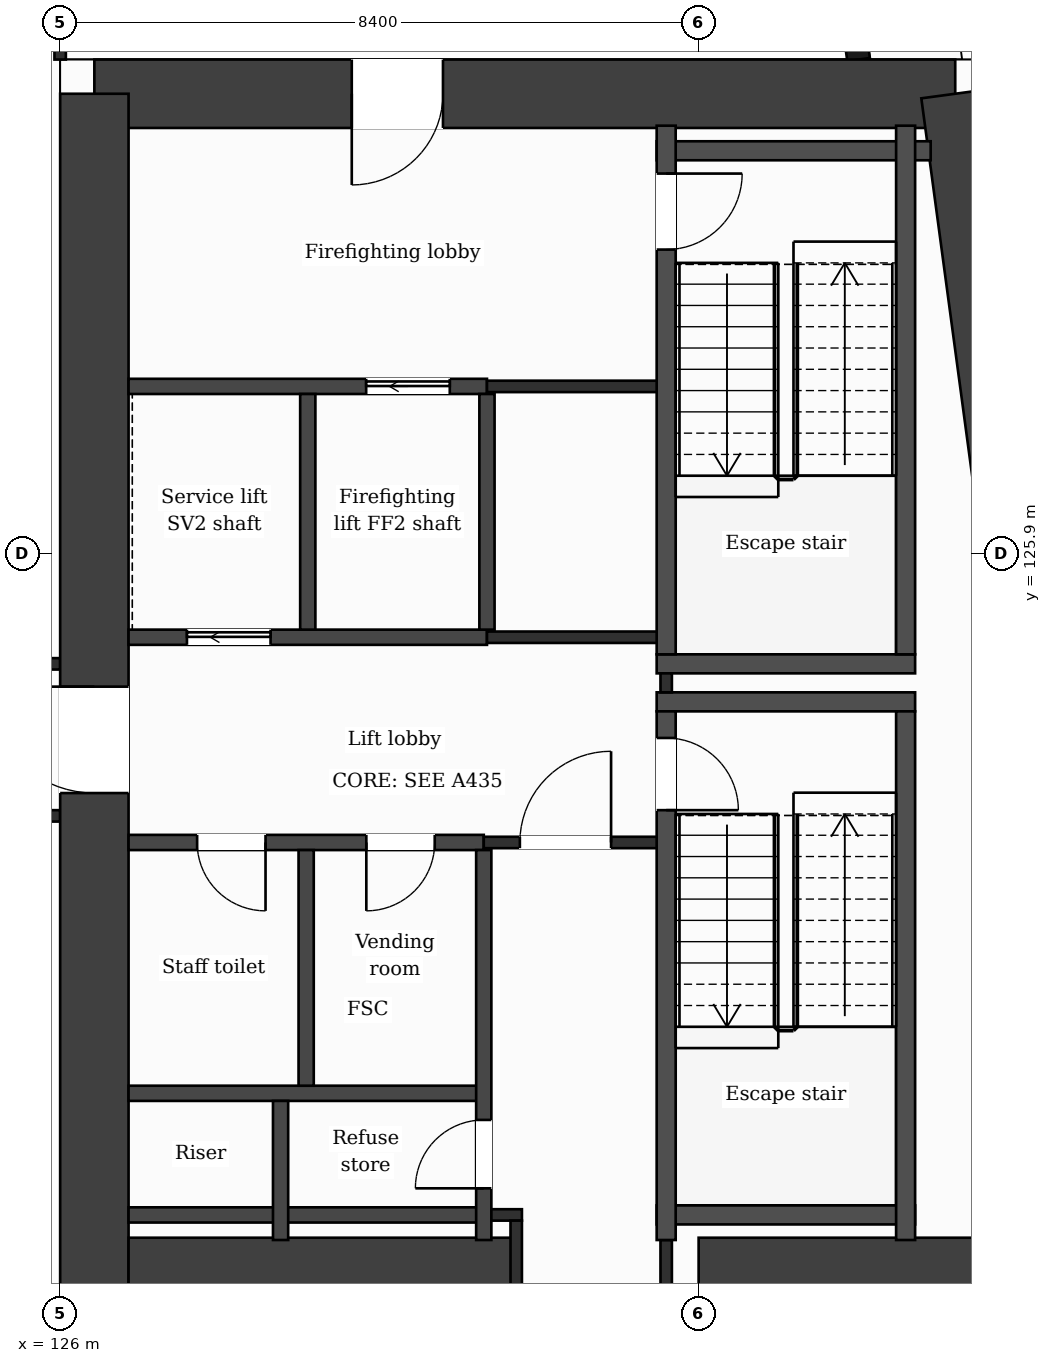
"""IFC4 building model, lengths in metres.
Left out: names, types, materials, properties, quantities, classifications, styles, units other than length and angle.
Written with IfcOpenShell. Run it as: python <this file> out.ifc"""

import sys

from ifc_helpers import new_model, si_unit, direction, frame, frame_2d, origin, place, context, subcontext, project, spatial, rectangle, extrude, element, fill, save


model = new_model("IFC4")
c1 = context("Model", 3, precision=1e-05, world=origin(), true_north=direction((0.0, 1.0)))
c2 = subcontext(c1, "Body", "Model", "MODEL_VIEW")
j1 = project(units=[si_unit("LENGTHUNIT", "METRE"), si_unit("PLANEANGLEUNIT", "RADIAN")], contexts=[c1])
p1 = place(None, origin())
s1 = spatial("IfcSite", under=j1, at=p1, CompositionType="ELEMENT")
p2 = place(p1, origin())
s2 = spatial("IfcBuilding", under=s1, at=p2, CompositionType="ELEMENT")
p3 = place(p2, frame((0.0, 0.0, 147.8)))
s3 = spatial("IfcBuildingStorey", under=s2, at=p3, CompositionType="ELEMENT", Elevation=147.8)
p4 = place(p3, frame((126.45, 131.95, 0.0), z_axis=(0.0, 0.0, 1.0), x_axis=(1.0, 0.0, 0.0)))
e1 = element("IfcWall", 1, at=p4, inside=s3, PredefinedType="SHEAR", context=c2, shape_type="SweptSolid", body=[
    extrude(rectangle(XDim=11.326, YDim=0.9, at=frame_2d((5.663, 0.0))), origin(), (0.0, 0.0, 1.0), 3.7),
])
p5 = place(p4, frame((3.386, 0.0, 0.0)))
e2 = element("IfcOpeningElement", 2, at=p5, cuts=e1, PredefinedType="OPENING", context=c2, shape_type="SweptSolid", body=[
    extrude(rectangle(XDim=1.2, YDim=2.1, at=frame_2d((0.6, 1.05))), frame((0.0, 0.46, 0.0), z_axis=(0.0, -1.0, 0.0), x_axis=(1.0, 0.0, 0.0)), (0.0, 0.0, 1.0), 0.92),
])
p6 = place(p3, frame((137.776, 131.95, 0.0), z_axis=(0.0, 0.0, 1.0), x_axis=(0.133421759112, -0.991059349482, 0.0)))
e3 = element("IfcWall", 3, at=p6, inside=s3, PredefinedType="SHEAR", context=c2, shape_type="SweptSolid", body=[
    extrude(rectangle(XDim=21.29, YDim=0.9, at=frame_2d((10.645, 0.0))), origin(), (0.0, 0.0, 1.0), 3.7),
])
p7 = place(p3, frame((126.45, 110.85, 0.0), z_axis=(0.0, 0.0, 1.0), x_axis=(0.0, 1.0, 0.0)))
e4 = element("IfcWall", 4, at=p7, inside=s3, PredefinedType="SHEAR", context=c2, shape_type="SweptSolid", body=[
    extrude(rectangle(XDim=21.1, YDim=0.9, at=frame_2d((10.55, 0.0))), origin(), (0.0, 0.0, 1.0), 3.7),
])
p8 = place(p7, frame((11.9, 0.0, 0.0)))
e5 = element("IfcOpeningElement", 5, at=p8, cuts=e4, PredefinedType="OPENING", context=c2, shape_type="SweptSolid", body=[
    extrude(rectangle(XDim=1.4, YDim=2.1, at=frame_2d((0.7, 1.05))), frame((0.0, 0.46, 0.0), z_axis=(0.0, -1.0, 0.0), x_axis=(1.0, 0.0, 0.0)), (0.0, 0.0, 1.0), 0.92),
])
p9 = place(p3, frame((126.9, 116.45, 0.0), z_axis=(0.0, 0.0, 1.0), x_axis=(1.0, 0.0, 0.0)))
e6 = element("IfcWall", 6, at=p9, inside=s3, PredefinedType="SHEAR", context=c2, shape_type="SweptSolid", body=[
    extrude(rectangle(XDim=5.1, YDim=0.9, at=frame_2d((2.55, 0.0))), origin(), (0.0, 0.0, 1.0), 3.7),
])
p10 = place(p3, frame((134.4, 116.45, 0.0), z_axis=(0.0, 0.0, 1.0), x_axis=(1.0, 0.0, 0.0)))
e7 = element("IfcWall", 7, at=p10, inside=s3, PredefinedType="SHEAR", context=c2, shape_type="SweptSolid", body=[
    extrude(rectangle(XDim=5.077, YDim=0.9, at=frame_2d((2.539, 0.0))), origin(), (0.0, 0.0, 1.0), 3.7),
])
p11 = place(p3, frame((136.504, 132.4, 0.0), z_axis=(0.0, 0.0, 1.0), x_axis=(-0.133399697462, 0.99106231929, 0.0)))
e8 = element("IfcWall", 8, at=p11, inside=s3, PredefinedType="SOLIDWALL", context=c2, shape_type="SweptSolid", body=[
    extrude(rectangle(XDim=6.74, YDim=0.3, at=frame_2d((3.37, 0.0))), origin(), (0.0, 0.0, 1.0), 3.38),
])
p12 = place(p11, frame((1.115, 0.0, 0.0)))
e9 = element("IfcOpeningElement", 9, at=p12, cuts=e8, PredefinedType="OPENING", context=c2, shape_type="SweptSolid", body=[
    extrude(rectangle(XDim=1.2, YDim=2.4, at=frame_2d((0.6, 1.2))), frame((0.0, 0.16, 0.0), z_axis=(0.0, -1.0, 0.0), x_axis=(1.0, 0.0, 0.0)), (0.0, 0.0, 1.0), 0.32),
])
p13 = place(p11, frame((3.835, 0.0, 0.9)))
e10 = element("IfcOpeningElement", 10, at=p13, cuts=e8, PredefinedType="OPENING", context=c2, shape_type="SweptSolid", body=[
    extrude(rectangle(XDim=2.4, YDim=2.1, at=frame_2d((1.2, 1.05))), frame((0.0, 0.16, 0.0), z_axis=(0.0, -1.0, 0.0), x_axis=(1.0, 0.0, 0.0)), (0.0, 0.0, 1.0), 0.32),
])
p14 = place(p3, frame((126.9, 117.2, 0.0), z_axis=(0.0, 0.0, 1.0), x_axis=(1.0, 0.0, 0.0)))
e11 = element("IfcWall", 11, at=p14, inside=s3, PredefinedType="PARTITIONING", context=c2, shape_type="SweptSolid", body=[
    extrude(rectangle(XDim=4.673, YDim=0.2, at=frame_2d((2.336, 0.0))), origin(), (0.0, 0.0, 1.0), 3.38),
])
p15 = place(p3, frame((131.573, 117.2, 0.0), z_axis=(0.0, 0.0, 1.0), x_axis=(1.0, 0.0, 0.0)))
e12 = element("IfcWall", 12, at=p15, inside=s3, PredefinedType="PARTITIONING", context=c2, shape_type="SweptSolid", body=[
    extrude(rectangle(XDim=0.502, YDim=0.15, at=frame_2d((0.251, 0.0))), origin(), (0.0, 0.0, 1.0), 3.38),
])
p16 = place(p3, frame((133.848, 117.2, 0.0), z_axis=(0.0, 0.0, 1.0), x_axis=(1.0, 0.0, 0.0)))
e13 = element("IfcWall", 13, at=p16, inside=s3, PredefinedType="PARTITIONING", context=c2, shape_type="SweptSolid", body=[
    extrude(rectangle(XDim=3.4, YDim=0.25, at=frame_2d((1.7, 0.0))), origin(), (0.0, 0.0, 1.0), 3.38),
])
p17 = place(p3, frame((126.9, 118.8, 0.0), z_axis=(0.0, 0.0, 1.0), x_axis=(1.0, 0.0, 0.0)))
e14 = element("IfcWall", 14, at=p17, inside=s3, PredefinedType="PARTITIONING", context=c2, shape_type="SweptSolid", body=[
    extrude(rectangle(XDim=4.673, YDim=0.2, at=frame_2d((2.336, 0.0))), origin(), (0.0, 0.0, 1.0), 3.38),
])
p18 = place(p3, frame((126.9, 122.1, 0.0), z_axis=(0.0, 0.0, 1.0), x_axis=(1.0, 0.0, 0.0)))
e15 = element("IfcWall", 15, at=p18, inside=s3, PredefinedType="PARTITIONING", context=c2, shape_type="SweptSolid", body=[
    extrude(rectangle(XDim=4.673, YDim=0.2, at=frame_2d((2.336, 0.0))), origin(), (0.0, 0.0, 1.0), 3.38),
])
p19 = place(p18, frame((3.128, 0.0, 0.0)))
e16 = element("IfcOpeningElement", 16, at=p19, cuts=e15, PredefinedType="OPENING", context=c2, shape_type="SweptSolid", body=[
    extrude(rectangle(XDim=0.9, YDim=2.1, at=frame_2d((0.45, 1.05))), frame((0.0, 0.11, 0.0), z_axis=(0.0, -1.0, 0.0), x_axis=(1.0, 0.0, 0.0)), (0.0, 0.0, 1.0), 0.22),
])
p20 = place(p18, frame((0.902, 0.0, 0.0)))
e17 = element("IfcOpeningElement", 17, at=p20, cuts=e15, PredefinedType="OPENING", context=c2, shape_type="SweptSolid", body=[
    extrude(rectangle(XDim=0.9, YDim=2.1, at=frame_2d((0.45, 1.05))), frame((0.0, 0.11, 0.0), z_axis=(0.0, -1.0, 0.0), x_axis=(1.0, 0.0, 0.0)), (0.0, 0.0, 1.0), 0.22),
])
p21 = place(p3, frame((131.573, 122.1, 0.0), z_axis=(0.0, 0.0, 1.0), x_axis=(1.0, 0.0, 0.0)))
e18 = element("IfcWall", 18, at=p21, inside=s3, PredefinedType="PARTITIONING", context=c2, shape_type="SweptSolid", body=[
    extrude(rectangle(XDim=2.4, YDim=0.15, at=frame_2d((1.2, 0.0))), origin(), (0.0, 0.0, 1.0), 3.38),
])
p22 = place(p21, frame((0.475, 0.0, 0.0)))
e19 = element("IfcOpeningElement", 19, at=p22, cuts=e18, PredefinedType="OPENING", context=c2, shape_type="SweptSolid", body=[
    extrude(rectangle(XDim=1.2, YDim=2.1, at=frame_2d((0.6, 1.05))), frame((0.0, 0.085, 0.0), z_axis=(0.0, -1.0, 0.0), x_axis=(1.0, 0.0, 0.0)), (0.0, 0.0, 1.0), 0.17),
])
p23 = place(p3, frame((100.8, 122.45, 0.0), z_axis=(0.0, 0.0, 1.0), x_axis=(1.0, 0.0, 0.0)))
e20 = element("IfcWall", 20, at=p23, inside=s3, PredefinedType="PARTITIONING", context=c2, shape_type="SweptSolid", body=[
    extrude(rectangle(XDim=25.2, YDim=0.15, at=frame_2d((12.6, 0.0))), origin(), (0.0, 0.0, 1.0), 3.38),
])
for number, where, z_axis, x_axis in (
    (21, (133.848, 123.95, 0.0), (0.0, 0.0, 1.0), (1.0, 0.0, 0.0)),
    (22, (133.848, 124.45, 0.0), (0.0, 0.0, 1.0), (1.0, 0.0, 0.0)),
):
    element("IfcWall", number, at=place(p3, frame(where, z_axis=z_axis, x_axis=x_axis)), inside=s3, PredefinedType="PARTITIONING", context=c2, shape_type="SweptSolid", body=[
        extrude(rectangle(XDim=3.4, YDim=0.25, at=frame_2d((1.7, 0.0))), origin(), (0.0, 0.0, 1.0), 3.38),
    ])
p24 = place(p3, frame((100.8, 124.45, 0.0), z_axis=(0.0, 0.0, 1.0), x_axis=(1.0, 0.0, 0.0)))
e23 = element("IfcWall", 23, at=p24, inside=s3, PredefinedType="PARTITIONING", context=c2, shape_type="SweptSolid", body=[
    extrude(rectangle(XDim=25.2, YDim=0.15, at=frame_2d((12.6, 0.0))), origin(), (0.0, 0.0, 1.0), 3.38),
])
p25 = place(p24, frame((3.03, 0.0, 0.0)))
e24 = element("IfcOpeningElement", 24, at=p25, cuts=e23, PredefinedType="OPENING", context=c2, shape_type="SweptSolid", body=[
    extrude(rectangle(XDim=1.0, YDim=2.1, at=frame_2d((0.5, 1.05))), frame((0.0, 0.085, 0.0), z_axis=(0.0, -1.0, 0.0), x_axis=(1.0, 0.0, 0.0)), (0.0, 0.0, 1.0), 0.17),
])
p26 = place(p24, frame((12.77, 0.0, 0.0)))
e25 = element("IfcOpeningElement", 25, at=p26, cuts=e23, PredefinedType="OPENING", context=c2, shape_type="SweptSolid", body=[
    extrude(rectangle(XDim=1.0, YDim=2.1, at=frame_2d((0.5, 1.05))), frame((0.0, 0.085, 0.0), z_axis=(0.0, -1.0, 0.0), x_axis=(1.0, 0.0, 0.0)), (0.0, 0.0, 1.0), 0.17),
])
p27 = place(p24, frame((17.67, 0.0, 0.0)))
e26 = element("IfcOpeningElement", 26, at=p27, cuts=e23, PredefinedType="OPENING", context=c2, shape_type="SweptSolid", body=[
    extrude(rectangle(XDim=1.0, YDim=2.1, at=frame_2d((0.5, 1.05))), frame((0.0, 0.085, 0.0), z_axis=(0.0, -1.0, 0.0), x_axis=(1.0, 0.0, 0.0)), (0.0, 0.0, 1.0), 0.17),
])
p28 = place(p24, frame((22.35, 0.0, 0.0)))
e27 = element("IfcOpeningElement", 27, at=p28, cuts=e23, PredefinedType="OPENING", context=c2, shape_type="SweptSolid", body=[
    extrude(rectangle(XDim=1.0, YDim=2.1, at=frame_2d((0.5, 1.05))), frame((0.0, 0.085, 0.0), z_axis=(0.0, -1.0, 0.0), x_axis=(1.0, 0.0, 0.0)), (0.0, 0.0, 1.0), 0.17),
])
p29 = place(p3, frame((126.9, 124.8, 0.0), z_axis=(0.0, 0.0, 1.0), x_axis=(1.0, 0.0, 0.0)))
e28 = element("IfcWall", 28, at=p29, inside=s3, PredefinedType="PARTITIONING", context=c2, shape_type="SweptSolid", body=[
    extrude(rectangle(XDim=4.715, YDim=0.2, at=frame_2d((2.358, 0.0))), origin(), (0.0, 0.0, 1.0), 3.38),
])
p30 = place(p29, frame((0.768, 0.0, 0.0)))
e29 = element("IfcOpeningElement", 29, at=p30, cuts=e28, PredefinedType="OPENING", context=c2, shape_type="SweptSolid", body=[
    extrude(rectangle(XDim=1.1, YDim=2.1, at=frame_2d((0.55, 1.05))), frame((0.0, 0.11, 0.0), z_axis=(0.0, -1.0, 0.0), x_axis=(1.0, 0.0, 0.0)), (0.0, 0.0, 1.0), 0.22),
])
p31 = place(p3, frame((131.615, 124.8, 0.0), z_axis=(0.0, 0.0, 1.0), x_axis=(1.0, 0.0, 0.0)))
e30 = element("IfcWall", 30, at=p31, inside=s3, PredefinedType="PARTITIONING", context=c2, shape_type="SweptSolid", body=[
    extrude(rectangle(XDim=2.483, YDim=0.15, at=frame_2d((1.241, 0.0))), origin(), (0.0, 0.0, 1.0), 3.38),
])
p32 = place(p3, frame((126.9, 128.1, 0.0), z_axis=(0.0, 0.0, 1.0), x_axis=(1.0, 0.0, 0.0)))
e31 = element("IfcWall", 31, at=p32, inside=s3, PredefinedType="PARTITIONING", context=c2, shape_type="SweptSolid", body=[
    extrude(rectangle(XDim=4.715, YDim=0.2, at=frame_2d((2.358, 0.0))), origin(), (0.0, 0.0, 1.0), 3.38),
])
p33 = place(p32, frame((3.126, 0.0, 0.0)))
e32 = element("IfcOpeningElement", 32, at=p33, cuts=e31, PredefinedType="OPENING", context=c2, shape_type="SweptSolid", body=[
    extrude(rectangle(XDim=1.1, YDim=2.1, at=frame_2d((0.55, 1.05))), frame((0.0, 0.11, 0.0), z_axis=(0.0, -1.0, 0.0), x_axis=(1.0, 0.0, 0.0)), (0.0, 0.0, 1.0), 0.22),
])
p34 = place(p3, frame((131.615, 128.1, 0.0), z_axis=(0.0, 0.0, 1.0), x_axis=(1.0, 0.0, 0.0)))
e33 = element("IfcWall", 33, at=p34, inside=s3, PredefinedType="PARTITIONING", context=c2, shape_type="SweptSolid", body=[
    extrude(rectangle(XDim=2.358, YDim=0.15, at=frame_2d((1.179, 0.0))), origin(), (0.0, 0.0, 1.0), 3.38),
])
p35 = place(p3, frame((133.848, 131.2, 0.0), z_axis=(0.0, 0.0, 1.0), x_axis=(1.0, 0.0, 0.0)))
e34 = element("IfcWall", 34, at=p35, inside=s3, PredefinedType="PARTITIONING", context=c2, shape_type="SweptSolid", body=[
    extrude(rectangle(XDim=3.605, YDim=0.25, at=frame_2d((1.802, 0.0))), origin(), (0.0, 0.0, 1.0), 3.38),
])
p36 = place(p3, frame((126.0, 132.4, 0.0), z_axis=(0.0, 0.0, 1.0), x_axis=(0.0, 1.0, 0.0)))
e35 = element("IfcWall", 35, at=p36, inside=s3, PredefinedType="PARTITIONING", context=c2, shape_type="SweptSolid", body=[
    extrude(rectangle(XDim=1.325, YDim=0.15, at=frame_2d((0.663, 0.0))), origin(), (0.0, 0.0, 1.0), 3.38),
])
p37 = place(p3, frame((128.9, 116.87, 0.0), z_axis=(0.0, 0.0, 1.0), x_axis=(0.0, 1.0, 0.0)))
e36 = element("IfcWall", 36, at=p37, inside=s3, PredefinedType="PARTITIONING", context=c2, shape_type="SweptSolid", body=[
    extrude(rectangle(XDim=1.83, YDim=0.2, at=frame_2d((0.915, 0.0))), origin(), (0.0, 0.0, 1.0), 3.38),
])
for number, where, z_axis, x_axis in (
    (37, (129.237, 118.9, 0.0), (0.0, 0.0, 1.0), (0.0, 1.0, 0.0)),
    (38, (129.258, 124.9, 0.0), (0.0, 0.0, 1.0), (0.0, 1.0, 0.0)),
):
    element("IfcWall", number, at=place(p3, frame(where, z_axis=z_axis, x_axis=x_axis)), inside=s3, PredefinedType="PARTITIONING", context=c2, shape_type="SweptSolid", body=[
        extrude(rectangle(XDim=3.1, YDim=0.2, at=frame_2d((1.55, 0.0))), origin(), (0.0, 0.0, 1.0), 3.38),
    ])
p38 = place(p3, frame((131.573, 116.87, 0.0), z_axis=(0.0, 0.0, 1.0), x_axis=(0.0, 1.0, 0.0)))
e39 = element("IfcWall", 39, at=p38, inside=s3, PredefinedType="PARTITIONING", context=c2, shape_type="SweptSolid", body=[
    extrude(rectangle(XDim=5.13, YDim=0.2, at=frame_2d((2.565, 0.0))), origin(), (0.0, 0.0, 1.0), 3.38),
])
p39 = place(p38, frame((0.68, 0.0, 0.0)))
e40 = element("IfcOpeningElement", 40, at=p39, cuts=e39, PredefinedType="OPENING", context=c2, shape_type="SweptSolid", body=[
    extrude(rectangle(XDim=0.9, YDim=2.1, at=frame_2d((0.45, 1.05))), frame((0.0, 0.11, 0.0), z_axis=(0.0, -1.0, 0.0), x_axis=(1.0, 0.0, 0.0)), (0.0, 0.0, 1.0), 0.22),
])
p40 = place(p3, frame((131.615, 124.9, 0.0), z_axis=(0.0, 0.0, 1.0), x_axis=(0.0, 1.0, 0.0)))
e41 = element("IfcWall", 41, at=p40, inside=s3, PredefinedType="PARTITIONING", context=c2, shape_type="SweptSolid", body=[
    extrude(rectangle(XDim=3.1, YDim=0.2, at=frame_2d((1.55, 0.0))), origin(), (0.0, 0.0, 1.0), 3.38),
])
p41 = place(p3, frame((132.0, 116.0, 0.0), z_axis=(0.0, 0.0, 1.0), x_axis=(0.0, 1.0, 0.0)))
e42 = element("IfcWall", 42, at=p41, inside=s3, PredefinedType="PARTITIONING", context=c2, shape_type="SweptSolid", body=[
    extrude(rectangle(XDim=1.125, YDim=0.15, at=frame_2d((0.562, 0.0))), origin(), (0.0, 0.0, 1.0), 3.38),
])
p42 = place(p3, frame((133.973, 116.0, 0.0), z_axis=(0.0, 0.0, 1.0), x_axis=(0.0, 1.0, 0.0)))
e43 = element("IfcWall", 43, at=p42, inside=s3, PredefinedType="PARTITIONING", context=c2, shape_type="SweptSolid", body=[
    extrude(rectangle(XDim=0.87, YDim=0.15, at=frame_2d((0.435, 0.0))), origin(), (0.0, 0.0, 1.0), 3.38),
])
p43 = place(p3, frame((133.973, 124.075, 0.0), z_axis=(0.0, 0.0, 1.0), x_axis=(0.0, 1.0, 0.0)))
e44 = element("IfcWall", 44, at=p43, inside=s3, PredefinedType="PARTITIONING", context=c2, shape_type="SweptSolid", body=[
    extrude(rectangle(XDim=0.25, YDim=0.15, at=frame_2d((0.125, 0.0))), origin(), (0.0, 0.0, 1.0), 3.38),
])
p44 = place(p3, frame((133.973, 116.87, 0.0), z_axis=(0.0, 0.0, 1.0), x_axis=(0.0, 1.0, 0.0)))
e45 = element("IfcWall", 45, at=p44, inside=s3, PredefinedType="PARTITIONING", context=c2, shape_type="SweptSolid", body=[
    extrude(rectangle(XDim=6.955, YDim=0.25, at=frame_2d((3.478, 0.0))), origin(), (0.0, 0.0, 1.0), 3.38),
])
p45 = place(p44, frame((5.655, 0.0, 0.0)))
e46 = element("IfcOpeningElement", 46, at=p45, cuts=e45, PredefinedType="OPENING", context=c2, shape_type="SweptSolid", body=[
    extrude(rectangle(XDim=0.95, YDim=2.1, at=frame_2d((0.475, 1.05))), frame((0.0, 0.135, 0.0), z_axis=(0.0, -1.0, 0.0), x_axis=(1.0, 0.0, 0.0)), (0.0, 0.0, 1.0), 0.27),
])
p46 = place(p3, frame((133.973, 124.575, 0.0), z_axis=(0.0, 0.0, 1.0), x_axis=(0.0, 1.0, 0.0)))
e47 = element("IfcWall", 47, at=p46, inside=s3, PredefinedType="PARTITIONING", context=c2, shape_type="SweptSolid", body=[
    extrude(rectangle(XDim=6.955, YDim=0.25, at=frame_2d((3.478, 0.0))), origin(), (0.0, 0.0, 1.0), 3.38),
])
p47 = place(p46, frame((5.325, 0.0, 0.0)))
e48 = element("IfcOpeningElement", 48, at=p47, cuts=e47, PredefinedType="OPENING", context=c2, shape_type="SweptSolid", body=[
    extrude(rectangle(XDim=1.0, YDim=2.1, at=frame_2d((0.5, 1.05))), frame((0.0, 0.135, 0.0), z_axis=(0.0, -1.0, 0.0), x_axis=(1.0, 0.0, 0.0)), (0.0, 0.0, 1.0), 0.27),
])
p48 = place(p3, frame((137.123, 116.87, 0.0), z_axis=(0.0, 0.0, 1.0), x_axis=(0.0, 1.0, 0.0)))
e49 = element("IfcWall", 49, at=p48, inside=s3, PredefinedType="PARTITIONING", context=c2, shape_type="SweptSolid", body=[
    extrude(rectangle(XDim=6.955, YDim=0.25, at=frame_2d((3.478, 0.0))), origin(), (0.0, 0.0, 1.0), 3.38),
])
p49 = place(p3, frame((137.123, 124.575, 0.0), z_axis=(0.0, 0.0, 1.0), x_axis=(0.0, 1.0, 0.0)))
e50 = element("IfcWall", 50, at=p49, inside=s3, PredefinedType="PARTITIONING", context=c2, shape_type="SweptSolid", body=[
    extrude(rectangle(XDim=6.955, YDim=0.25, at=frame_2d((3.478, 0.0))), origin(), (0.0, 0.0, 1.0), 3.38),
])
p50 = place(p22, origin())
e51 = element("IfcDoor", 51, at=p50, inside=s3, OperationType="SINGLE_SWING_RIGHT", PredefinedType="DOOR", context=c2, shape_type="SweptSolid", body=[
    extrude(rectangle(XDim=1.2, YDim=2.1, at=frame_2d((0.6, 1.05))), frame((0.0, 0.025, 0.0), z_axis=(0.0, -1.0, 0.0), x_axis=(1.0, 0.0, 0.0)), (0.0, 0.0, 1.0), 0.05),
])
fill(e19, e51)
p51 = place(p33, origin())
e52 = element("IfcDoor", 52, at=p51, inside=s3, OperationType="SLIDING_TO_LEFT", PredefinedType="DOOR", context=c2, shape_type="SweptSolid", body=[
    extrude(rectangle(XDim=1.1, YDim=2.1, at=frame_2d((0.55, 1.05))), frame((0.0, 0.025, 0.0), z_axis=(0.0, -1.0, 0.0), x_axis=(1.0, 0.0, 0.0)), (0.0, 0.0, 1.0), 0.05),
])
fill(e32, e52)
p52 = place(p30, origin())
e53 = element("IfcDoor", 53, at=p52, inside=s3, OperationType="SLIDING_TO_LEFT", PredefinedType="DOOR", context=c2, shape_type="SweptSolid", body=[
    extrude(rectangle(XDim=1.1, YDim=2.1, at=frame_2d((0.55, 1.05))), frame((0.0, 0.025, 0.0), z_axis=(0.0, -1.0, 0.0), x_axis=(1.0, 0.0, 0.0)), (0.0, 0.0, 1.0), 0.05),
])
fill(e29, e53)
p53 = place(p19, origin())
e54 = element("IfcDoor", 54, at=p53, inside=s3, OperationType="SINGLE_SWING_LEFT", PredefinedType="DOOR", context=c2, shape_type="SweptSolid", body=[
    extrude(rectangle(XDim=0.9, YDim=2.1, at=frame_2d((0.45, 1.05))), frame((0.0, 0.025, 0.0), z_axis=(0.0, -1.0, 0.0), x_axis=(1.0, 0.0, 0.0)), (0.0, 0.0, 1.0), 0.05),
])
fill(e16, e54)
p54 = place(p20, origin())
e55 = element("IfcDoor", 55, at=p54, inside=s3, OperationType="SINGLE_SWING_RIGHT", PredefinedType="DOOR", context=c2, shape_type="SweptSolid", body=[
    extrude(rectangle(XDim=0.9, YDim=2.1, at=frame_2d((0.45, 1.05))), frame((0.0, 0.025, 0.0), z_axis=(0.0, -1.0, 0.0), x_axis=(1.0, 0.0, 0.0)), (0.0, 0.0, 1.0), 0.05),
])
fill(e17, e55)
p55 = place(p45, origin())
e56 = element("IfcDoor", 56, at=p55, inside=s3, OperationType="SINGLE_SWING_LEFT", PredefinedType="DOOR", context=c2, shape_type="SweptSolid", body=[
    extrude(rectangle(XDim=0.95, YDim=2.1, at=frame_2d((0.475, 1.05))), frame((0.0, 0.025, 0.0), z_axis=(0.0, -1.0, 0.0), x_axis=(1.0, 0.0, 0.0)), (0.0, 0.0, 1.0), 0.05),
])
fill(e46, e56)
p56 = place(p47, origin())
e57 = element("IfcDoor", 57, at=p56, inside=s3, OperationType="SINGLE_SWING_RIGHT", PredefinedType="DOOR", context=c2, shape_type="SweptSolid", body=[
    extrude(rectangle(XDim=1.0, YDim=2.1, at=frame_2d((0.5, 1.05))), frame((0.0, 0.025, 0.0), z_axis=(0.0, -1.0, 0.0), x_axis=(1.0, 0.0, 0.0)), (0.0, 0.0, 1.0), 0.05),
])
fill(e48, e57)
p57 = place(p39, origin())
e58 = element("IfcDoor", 58, at=p57, inside=s3, OperationType="SINGLE_SWING_LEFT", PredefinedType="DOOR", context=c2, shape_type="SweptSolid", body=[
    extrude(rectangle(XDim=0.9, YDim=2.1, at=frame_2d((0.45, 1.05))), frame((0.0, 0.025, 0.0), z_axis=(0.0, -1.0, 0.0), x_axis=(1.0, 0.0, 0.0)), (0.0, 0.0, 1.0), 0.05),
])
fill(e40, e58)
p58 = place(p5, origin())
e59 = element("IfcDoor", 59, at=p58, inside=s3, OperationType="SINGLE_SWING_LEFT", PredefinedType="DOOR", context=c2, shape_type="SweptSolid", body=[
    extrude(rectangle(XDim=1.2, YDim=2.1, at=frame_2d((0.6, 1.05))), frame((0.0, 0.025, 0.0), z_axis=(0.0, -1.0, 0.0), x_axis=(1.0, 0.0, 0.0)), (0.0, 0.0, 1.0), 0.05),
])
fill(e2, e59)
p59 = place(p8, origin())
e60 = element("IfcDoor", 60, at=p59, inside=s3, OperationType="SINGLE_SWING_RIGHT", PredefinedType="DOOR", context=c2, shape_type="SweptSolid", body=[
    extrude(rectangle(XDim=1.4, YDim=2.1, at=frame_2d((0.7, 1.05))), frame((0.0, 0.025, 0.0), z_axis=(0.0, -1.0, 0.0), x_axis=(1.0, 0.0, 0.0)), (0.0, 0.0, 1.0), 0.05),
])
fill(e5, e60)
save(model, sys.argv[1])
